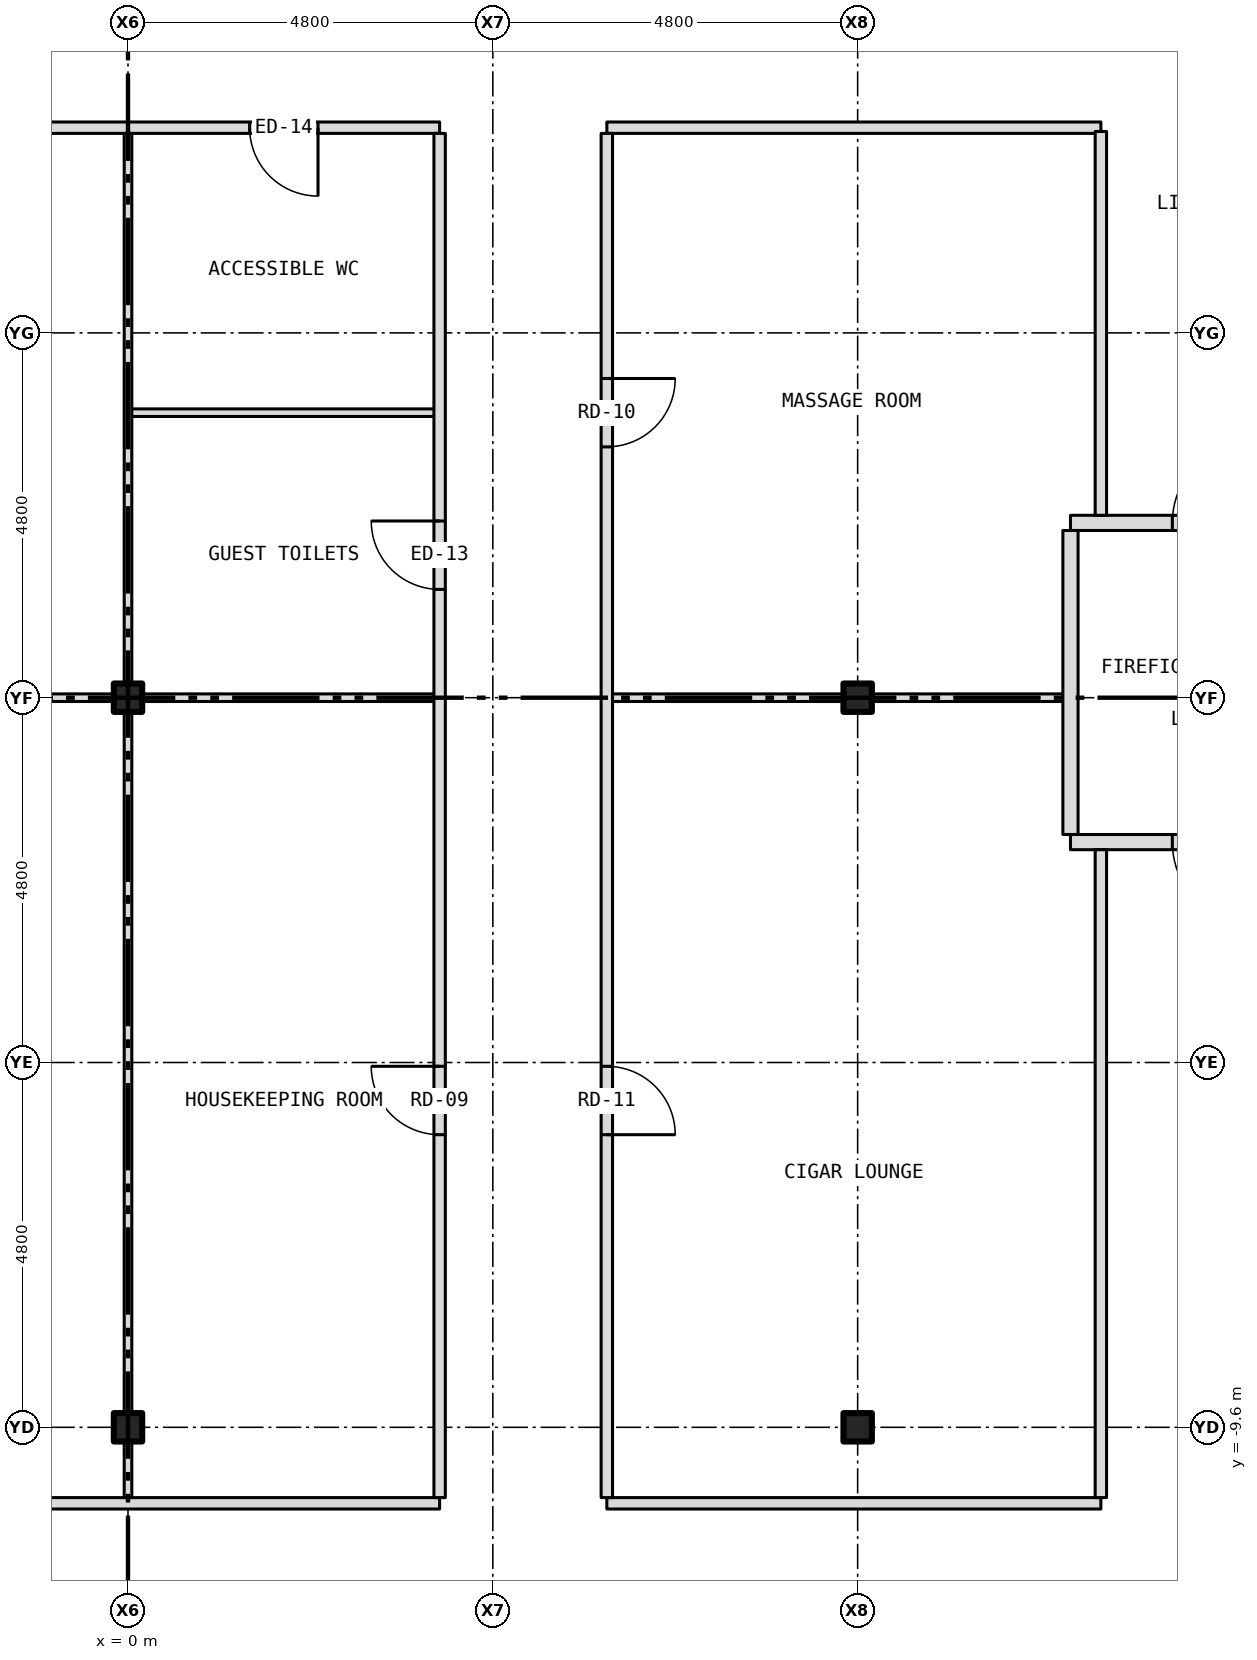
"""IFC4 building model, lengths in metres.
Left out: names, types, materials, properties, quantities, classifications, styles, units other than length and angle.
Written with IfcOpenShell. Run it as: python <this file> out.ifc"""

import sys

from ifc_helpers import new_model, si_unit, direction, frame, frame_2d, origin, origin_2d, place, context, subcontext, project, spatial, rectangle, i_section, extrude, element, fill, save


model = new_model("IFC4")
c1 = context("Model", 3, precision=1e-05, world=origin(), true_north=direction((0.0, 1.0)))
c2 = subcontext(c1, "Body", "Model", "MODEL_VIEW")
j1 = project(units=[si_unit("LENGTHUNIT", "METRE"), si_unit("PLANEANGLEUNIT", "RADIAN")], contexts=[c1])
p1 = place(None, origin())
s1 = spatial("IfcSite", under=j1, at=p1, CompositionType="ELEMENT")
p2 = place(p1, origin())
s2 = spatial("IfcBuilding", under=s1, at=p2, CompositionType="ELEMENT")
p3 = place(p2, frame((0.0, 0.0, 205.0)))
s3 = spatial("IfcBuildingStorey", under=s2, at=p3, CompositionType="ELEMENT", Elevation=205.0)
for number, where, z_axis, x_axis in (
    (1, (0.0, -9.6, -0.15), (0.0, 0.0, 1.0), (1.0, 0.0, 0.0)),
    (2, (0.0, 0.0, -0.15), (0.0, 0.0, 1.0), (1.0, 0.0, 0.0)),
    (3, (9.6, -9.6, -0.15), (0.0, 0.0, 1.0), (1.0, 0.0, 0.0)),
    (4, (9.6, 0.0, -0.15), (0.0, 0.0, 1.0), (1.0, 0.0, 0.0)),
):
    element("IfcColumn", number, at=place(p3, frame(where, z_axis=z_axis, x_axis=x_axis)), inside=s3, PredefinedType="COLUMN", context=c2, shape_type="SweptSolid", body=[
        extrude(i_section(OverallWidth=0.373, OverallDepth=0.373, WebThickness=0.016, FlangeThickness=0.026, at=origin_2d()), origin(), (0.0, 0.0, 1.0), 3.5),
    ])
p4 = place(p3, frame((-12.8, -10.6, 0.0), z_axis=(0.0, 0.0, 1.0), x_axis=(1.0, 0.0, 0.0)))
e5 = element("IfcWall", 5, at=p4, inside=s3, PredefinedType="PARTITIONING", context=c2, shape_type="SweptSolid", body=[
    extrude(rectangle(XDim=16.9, YDim=0.15, at=frame_2d((8.45, 0.0))), origin(), (0.0, 0.0, 1.0), 3.35),
])
p5 = place(p4, frame((5.95, 0.0, 0.0)))
e6 = element("IfcOpeningElement", 6, at=p5, cuts=e5, PredefinedType="OPENING", context=c2, shape_type="SweptSolid", body=[
    extrude(rectangle(XDim=0.9, YDim=2.1, at=frame_2d((0.45, 1.05))), frame((0.0, 0.087, 0.0), z_axis=(0.0, -1.0, 0.0), x_axis=(1.0, 0.0, 0.0)), (0.0, 0.0, 1.0), 0.174),
])
p6 = place(p3, frame((6.3, -10.6, 0.0), z_axis=(0.0, 0.0, 1.0), x_axis=(1.0, 0.0, 0.0)))
e7 = element("IfcWall", 7, at=p6, inside=s3, PredefinedType="PARTITIONING", context=c2, shape_type="SweptSolid", body=[
    extrude(rectangle(XDim=6.5, YDim=0.15, at=frame_2d((3.25, 0.0))), origin(), (0.0, 0.0, 1.0), 3.35),
])
p7 = place(p3, frame((12.4, -1.9, 0.0), z_axis=(0.0, 0.0, 1.0), x_axis=(1.0, 0.0, 0.0)))
e8 = element("IfcWall", 8, at=p7, inside=s3, PredefinedType="PARTITIONING", context=c2, shape_type="SweptSolid", body=[
    extrude(rectangle(XDim=3.28, YDim=0.2, at=frame_2d((1.64, 0.0))), origin(), (0.0, 0.0, 1.0), 3.35),
])
p8 = place(p7, frame((1.34, 0.0, 0.0)))
e9 = element("IfcOpeningElement", 9, at=p8, cuts=e8, PredefinedType="OPENING", context=c2, shape_type="SweptSolid", body=[
    extrude(rectangle(XDim=1.1, YDim=2.1, at=frame_2d((0.55, 1.05))), frame((0.0, 0.112, 0.0), z_axis=(0.0, -1.0, 0.0), x_axis=(1.0, 0.0, 0.0)), (0.0, 0.0, 1.0), 0.224),
])
p9 = place(p3, frame((-9.413, 0.0, 0.0), z_axis=(0.0, 0.0, 1.0), x_axis=(1.0, 0.0, 0.0)))
e10 = element("IfcWall", 10, at=p9, inside=s3, PredefinedType="PARTITIONING", context=c2, shape_type="SweptSolid", body=[
    extrude(rectangle(XDim=9.226, YDim=0.1, at=frame_2d((4.613, 0.0))), origin(), (0.0, 0.0, 1.0), 2.728),
])
p10 = place(p3, frame((-0.187, 0.0, 0.0), z_axis=(0.0, 0.0, 1.0), x_axis=(1.0, 0.0, 0.0)))
e11 = element("IfcWall", 11, at=p10, inside=s3, PredefinedType="PARTITIONING", context=c2, shape_type="SweptSolid", body=[
    extrude(rectangle(XDim=0.374, YDim=0.1, at=frame_2d((0.187, 0.0))), origin(), (0.0, 0.0, 1.0), 3.35),
])
p11 = place(p3, frame((0.187, 0.0, 0.0), z_axis=(0.0, 0.0, 1.0), x_axis=(1.0, 0.0, 0.0)))
e12 = element("IfcWall", 12, at=p11, inside=s3, PredefinedType="PARTITIONING", context=c2, shape_type="SweptSolid", body=[
    extrude(rectangle(XDim=3.913, YDim=0.1, at=frame_2d((1.957, 0.0))), origin(), (0.0, 0.0, 1.0), 2.728),
])
p12 = place(p3, frame((6.3, 0.0, 0.0), z_axis=(0.0, 0.0, 1.0), x_axis=(1.0, 0.0, 0.0)))
e13 = element("IfcWall", 13, at=p12, inside=s3, PredefinedType="PARTITIONING", context=c2, shape_type="SweptSolid", body=[
    extrude(rectangle(XDim=3.113, YDim=0.1, at=frame_2d((1.557, 0.0))), origin(), (0.0, 0.0, 1.0), 2.728),
])
p13 = place(p3, frame((9.413, 0.0, 0.0), z_axis=(0.0, 0.0, 1.0), x_axis=(1.0, 0.0, 0.0)))
e14 = element("IfcWall", 14, at=p13, inside=s3, PredefinedType="PARTITIONING", context=c2, shape_type="SweptSolid", body=[
    extrude(rectangle(XDim=0.374, YDim=0.1, at=frame_2d((0.187, 0.0))), origin(), (0.0, 0.0, 1.0), 3.35),
])
p14 = place(p3, frame((9.787, 0.0, 0.0), z_axis=(0.0, 0.0, 1.0), x_axis=(1.0, 0.0, 0.0)))
e15 = element("IfcWall", 15, at=p14, inside=s3, PredefinedType="PARTITIONING", context=c2, shape_type="SweptSolid", body=[
    extrude(rectangle(XDim=2.613, YDim=0.1, at=frame_2d((1.306, 0.0))), origin(), (0.0, 0.0, 1.0), 2.728),
])
p15 = place(p3, frame((12.4, 2.3, 0.0), z_axis=(0.0, 0.0, 1.0), x_axis=(1.0, 0.0, 0.0)))
e16 = element("IfcWall", 16, at=p15, inside=s3, PredefinedType="PARTITIONING", context=c2, shape_type="SweptSolid", body=[
    extrude(rectangle(XDim=3.28, YDim=0.2, at=frame_2d((1.64, 0.0))), origin(), (0.0, 0.0, 1.0), 3.35),
])
p16 = place(p15, frame((1.34, 0.0, 0.0)))
e17 = element("IfcOpeningElement", 17, at=p16, cuts=e16, PredefinedType="OPENING", context=c2, shape_type="SweptSolid", body=[
    extrude(rectangle(XDim=1.1, YDim=2.1, at=frame_2d((0.55, 1.05))), frame((0.0, 0.112, 0.0), z_axis=(0.0, -1.0, 0.0), x_axis=(1.0, 0.0, 0.0)), (0.0, 0.0, 1.0), 0.224),
])
p17 = place(p3, frame((0.0, 3.75, 0.0), z_axis=(0.0, 0.0, 1.0), x_axis=(1.0, 0.0, 0.0)))
e18 = element("IfcWall", 18, at=p17, inside=s3, PredefinedType="PARTITIONING", context=c2, shape_type="SweptSolid", body=[
    extrude(rectangle(XDim=4.1, YDim=0.1, at=frame_2d((2.05, 0.0))), origin(), (0.0, 0.0, 1.0), 3.35),
])
p18 = place(p3, frame((-12.8, 7.5, 0.0), z_axis=(0.0, 0.0, 1.0), x_axis=(1.0, 0.0, 0.0)))
e19 = element("IfcWall", 19, at=p18, inside=s3, PredefinedType="PARTITIONING", context=c2, shape_type="SweptSolid", body=[
    extrude(rectangle(XDim=16.9, YDim=0.15, at=frame_2d((8.45, 0.0))), origin(), (0.0, 0.0, 1.0), 3.35),
])
p19 = place(p18, frame((14.4, 0.0, 0.0)))
e20 = element("IfcOpeningElement", 20, at=p19, cuts=e19, PredefinedType="OPENING", context=c2, shape_type="SweptSolid", body=[
    extrude(rectangle(XDim=0.9, YDim=2.1, at=frame_2d((0.45, 1.05))), frame((0.0, 0.087, 0.0), z_axis=(0.0, -1.0, 0.0), x_axis=(1.0, 0.0, 0.0)), (0.0, 0.0, 1.0), 0.174),
])
p20 = place(p18, frame((5.95, 0.0, 0.0)))
e21 = element("IfcOpeningElement", 21, at=p20, cuts=e19, PredefinedType="OPENING", context=c2, shape_type="SweptSolid", body=[
    extrude(rectangle(XDim=0.9, YDim=2.1, at=frame_2d((0.45, 1.05))), frame((0.0, 0.087, 0.0), z_axis=(0.0, -1.0, 0.0), x_axis=(1.0, 0.0, 0.0)), (0.0, 0.0, 1.0), 0.174),
])
p21 = place(p3, frame((6.3, 7.5, 0.0), z_axis=(0.0, 0.0, 1.0), x_axis=(1.0, 0.0, 0.0)))
e22 = element("IfcWall", 22, at=p21, inside=s3, PredefinedType="PARTITIONING", context=c2, shape_type="SweptSolid", body=[
    extrude(rectangle(XDim=6.5, YDim=0.15, at=frame_2d((3.25, 0.0))), origin(), (0.0, 0.0, 1.0), 3.35),
])
p22 = place(p3, frame((0.0, -10.525, 0.0), z_axis=(0.0, 0.0, 1.0), x_axis=(0.0, 1.0, 0.0)))
e23 = element("IfcWall", 23, at=p22, inside=s3, PredefinedType="PARTITIONING", context=c2, shape_type="SweptSolid", body=[
    extrude(rectangle(XDim=0.738, YDim=0.1, at=frame_2d((0.369, 0.0))), origin(), (0.0, 0.0, 1.0), 2.728),
])
p23 = place(p3, frame((0.0, -9.787, 0.0), z_axis=(0.0, 0.0, 1.0), x_axis=(0.0, 1.0, 0.0)))
e24 = element("IfcWall", 24, at=p23, inside=s3, PredefinedType="PARTITIONING", context=c2, shape_type="SweptSolid", body=[
    extrude(rectangle(XDim=0.374, YDim=0.1, at=frame_2d((0.187, 0.0))), origin(), (0.0, 0.0, 1.0), 3.35),
])
p24 = place(p3, frame((0.0, -9.413, 0.0), z_axis=(0.0, 0.0, 1.0), x_axis=(0.0, 1.0, 0.0)))
e25 = element("IfcWall", 25, at=p24, inside=s3, PredefinedType="PARTITIONING", context=c2, shape_type="SweptSolid", body=[
    extrude(rectangle(XDim=9.363, YDim=0.1, at=frame_2d((4.682, 0.0))), origin(), (0.0, 0.0, 1.0), 2.728),
])
p25 = place(p3, frame((0.0, 0.05, 0.0), z_axis=(0.0, 0.0, 1.0), x_axis=(0.0, 1.0, 0.0)))
e26 = element("IfcWall", 26, at=p25, inside=s3, PredefinedType="PARTITIONING", context=c2, shape_type="SweptSolid", body=[
    extrude(rectangle(XDim=7.375, YDim=0.1, at=frame_2d((3.688, 0.0))), origin(), (0.0, 0.0, 1.0), 2.728),
])
p26 = place(p3, frame((4.1, -10.525, 0.0), z_axis=(0.0, 0.0, 1.0), x_axis=(0.0, 1.0, 0.0)))
e27 = element("IfcWall", 27, at=p26, inside=s3, PredefinedType="PARTITIONING", context=c2, shape_type="SweptSolid", body=[
    extrude(rectangle(XDim=17.95, YDim=0.15, at=frame_2d((8.975, 0.0))), origin(), (0.0, 0.0, 1.0), 3.35),
])
p27 = place(p26, frame((11.95, 0.0, 0.0)))
e28 = element("IfcOpeningElement", 28, at=p27, cuts=e27, PredefinedType="OPENING", context=c2, shape_type="SweptSolid", body=[
    extrude(rectangle(XDim=0.9, YDim=2.1, at=frame_2d((0.45, 1.05))), frame((0.0, 0.087, 0.0), z_axis=(0.0, -1.0, 0.0), x_axis=(1.0, 0.0, 0.0)), (0.0, 0.0, 1.0), 0.174),
])
p28 = place(p26, frame((4.775, 0.0, 0.0)))
e29 = element("IfcOpeningElement", 29, at=p28, cuts=e27, PredefinedType="OPENING", context=c2, shape_type="SweptSolid", body=[
    extrude(rectangle(XDim=0.9, YDim=2.1, at=frame_2d((0.45, 1.05))), frame((0.0, 0.087, 0.0), z_axis=(0.0, -1.0, 0.0), x_axis=(1.0, 0.0, 0.0)), (0.0, 0.0, 1.0), 0.174),
])
p29 = place(p3, frame((6.3, -10.525, 0.0), z_axis=(0.0, 0.0, 1.0), x_axis=(0.0, 1.0, 0.0)))
e30 = element("IfcWall", 30, at=p29, inside=s3, PredefinedType="PARTITIONING", context=c2, shape_type="SweptSolid", body=[
    extrude(rectangle(XDim=17.95, YDim=0.15, at=frame_2d((8.975, 0.0))), origin(), (0.0, 0.0, 1.0), 3.35),
])
p30 = place(p29, frame((13.825, 0.0, 0.0)))
e31 = element("IfcOpeningElement", 31, at=p30, cuts=e30, PredefinedType="OPENING", context=c2, shape_type="SweptSolid", body=[
    extrude(rectangle(XDim=0.9, YDim=2.1, at=frame_2d((0.45, 1.05))), frame((0.0, 0.087, 0.0), z_axis=(0.0, -1.0, 0.0), x_axis=(1.0, 0.0, 0.0)), (0.0, 0.0, 1.0), 0.174),
])
p31 = place(p29, frame((4.775, 0.0, 0.0)))
e32 = element("IfcOpeningElement", 32, at=p31, cuts=e30, PredefinedType="OPENING", context=c2, shape_type="SweptSolid", body=[
    extrude(rectangle(XDim=0.9, YDim=2.1, at=frame_2d((0.45, 1.05))), frame((0.0, 0.087, 0.0), z_axis=(0.0, -1.0, 0.0), x_axis=(1.0, 0.0, 0.0)), (0.0, 0.0, 1.0), 0.174),
])
p32 = place(p3, frame((12.4, -1.8, 0.0), z_axis=(0.0, 0.0, 1.0), x_axis=(0.0, 1.0, 0.0)))
e33 = element("IfcWall", 33, at=p32, inside=s3, PredefinedType="PARTITIONING", context=c2, shape_type="SweptSolid", body=[
    extrude(rectangle(XDim=4.0, YDim=0.2, at=frame_2d((2.0, 0.0))), origin(), (0.0, 0.0, 1.0), 3.35),
])
p33 = place(p3, frame((12.8, -10.525, 0.0), z_axis=(0.0, 0.0, 1.0), x_axis=(0.0, 1.0, 0.0)))
e34 = element("IfcWall", 34, at=p33, inside=s3, PredefinedType="PARTITIONING", context=c2, shape_type="SweptSolid", body=[
    extrude(rectangle(XDim=8.525, YDim=0.15, at=frame_2d((4.262, 0.0))), origin(), (0.0, 0.0, 1.0), 3.35),
])
p34 = place(p3, frame((12.8, 2.4, 0.0), z_axis=(0.0, 0.0, 1.0), x_axis=(0.0, 1.0, 0.0)))
e35 = element("IfcWall", 35, at=p34, inside=s3, PredefinedType="PARTITIONING", context=c2, shape_type="SweptSolid", body=[
    extrude(rectangle(XDim=5.05, YDim=0.15, at=frame_2d((2.525, 0.0))), origin(), (0.0, 0.0, 1.0), 3.35),
])
p35 = place(p16, origin())
e36 = element("IfcDoor", 36, at=p35, inside=s3, OperationType="SINGLE_SWING_RIGHT", PredefinedType="DOOR", context=c2, shape_type="SweptSolid", body=[
    extrude(rectangle(XDim=1.1, YDim=2.1, at=frame_2d((0.55, 1.05))), frame((0.0, 0.025, 0.0), z_axis=(0.0, -1.0, 0.0), x_axis=(1.0, 0.0, 0.0)), (0.0, 0.0, 1.0), 0.05),
])
fill(e17, e36)
p36 = place(p8, origin())
e37 = element("IfcDoor", 37, at=p36, inside=s3, OperationType="SINGLE_SWING_RIGHT", PredefinedType="DOOR", context=c2, shape_type="SweptSolid", body=[
    extrude(rectangle(XDim=1.1, YDim=2.1, at=frame_2d((0.55, 1.05))), frame((0.0, 0.025, 0.0), z_axis=(0.0, -1.0, 0.0), x_axis=(1.0, 0.0, 0.0)), (0.0, 0.0, 1.0), 0.05),
])
fill(e9, e37)
p37 = place(p27, origin())
e38 = element("IfcDoor", 38, at=p37, inside=s3, OperationType="SINGLE_SWING_RIGHT", PredefinedType="DOOR", context=c2, shape_type="SweptSolid", body=[
    extrude(rectangle(XDim=0.9, YDim=2.1, at=frame_2d((0.45, 1.05))), frame((0.0, 0.025, 0.0), z_axis=(0.0, -1.0, 0.0), x_axis=(1.0, 0.0, 0.0)), (0.0, 0.0, 1.0), 0.05),
])
fill(e28, e38)
p38 = place(p19, origin())
e39 = element("IfcDoor", 39, at=p38, inside=s3, OperationType="SINGLE_SWING_RIGHT", PredefinedType="DOOR", context=c2, shape_type="SweptSolid", body=[
    extrude(rectangle(XDim=0.9, YDim=2.1, at=frame_2d((0.45, 1.05))), frame((0.0, 0.025, 0.0), z_axis=(0.0, -1.0, 0.0), x_axis=(1.0, 0.0, 0.0)), (0.0, 0.0, 1.0), 0.05),
])
fill(e20, e39)
p39 = place(p28, origin())
e40 = element("IfcDoor", 40, at=p39, inside=s3, OperationType="SINGLE_SWING_RIGHT", PredefinedType="DOOR", context=c2, shape_type="SweptSolid", body=[
    extrude(rectangle(XDim=0.9, YDim=2.1, at=frame_2d((0.45, 1.05))), frame((0.0, 0.025, 0.0), z_axis=(0.0, -1.0, 0.0), x_axis=(1.0, 0.0, 0.0)), (0.0, 0.0, 1.0), 0.05),
])
fill(e29, e40)
p40 = place(p30, origin())
e41 = element("IfcDoor", 41, at=p40, inside=s3, OperationType="SINGLE_SWING_RIGHT", PredefinedType="DOOR", context=c2, shape_type="SweptSolid", body=[
    extrude(rectangle(XDim=0.9, YDim=2.1, at=frame_2d((0.45, 1.05))), frame((0.0, 0.025, 0.0), z_axis=(0.0, -1.0, 0.0), x_axis=(1.0, 0.0, 0.0)), (0.0, 0.0, 1.0), 0.05),
])
fill(e31, e41)
p41 = place(p31, origin())
e42 = element("IfcDoor", 42, at=p41, inside=s3, OperationType="SINGLE_SWING_LEFT", PredefinedType="DOOR", context=c2, shape_type="SweptSolid", body=[
    extrude(rectangle(XDim=0.9, YDim=2.1, at=frame_2d((0.45, 1.05))), frame((0.0, 0.025, 0.0), z_axis=(0.0, -1.0, 0.0), x_axis=(1.0, 0.0, 0.0)), (0.0, 0.0, 1.0), 0.05),
])
fill(e32, e42)
save(model, sys.argv[1])
